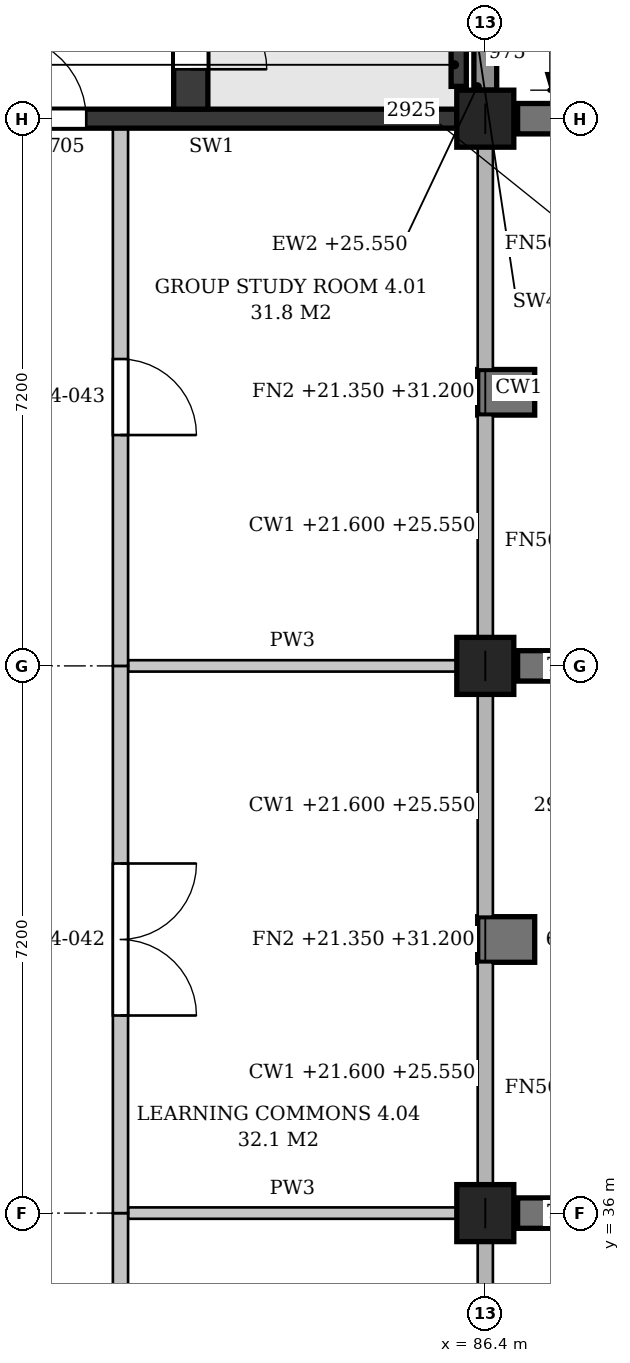
"""IFC4 building model, lengths in metres.
Left out: names, types, materials, properties, quantities, classifications, styles, units other than length and angle.
Written with IfcOpenShell. Run it as: python <this file> out.ifc"""

import sys

from ifc_helpers import new_model, si_unit, direction, frame, frame_2d, origin, origin_2d, place, context, subcontext, project, spatial, polyline, rectangle, outline, extrude, element, fill, save


model = new_model("IFC4")
c1 = context("Model", 3, precision=1e-05, world=origin(), true_north=direction((0.0, 1.0)))
c2 = subcontext(c1, "Body", "Model", "MODEL_VIEW")
j1 = project(units=[si_unit("LENGTHUNIT", "METRE"), si_unit("PLANEANGLEUNIT", "RADIAN")], contexts=[c1])
p1 = place(None, origin())
s1 = spatial("IfcSite", under=j1, at=p1, CompositionType="ELEMENT")
p2 = place(p1, origin())
s2 = spatial("IfcBuilding", under=s1, at=p2, CompositionType="ELEMENT")
p3 = place(p2, frame((0.0, 0.0, 21.6)))
s3 = spatial("IfcBuildingStorey", under=s2, at=p3, CompositionType="ELEMENT", Elevation=21.6)
for number, where, z_axis, x_axis in (
    (1, (86.4, 36.0, 0.0), (0.0, 0.0, 1.0), (1.0, 0.0, 0.0)),
    (2, (86.4, 43.2, 0.0), (0.0, 0.0, 1.0), (1.0, 0.0, 0.0)),
    (3, (86.4, 50.4, 0.0), (0.0, 0.0, 1.0), (1.0, 0.0, 0.0)),
):
    element("IfcColumn", number, at=place(p3, frame(where, z_axis=z_axis, x_axis=x_axis)), inside=s3, PredefinedType="COLUMN", context=c2, shape_type="SweptSolid", body=[
        extrude(rectangle(XDim=0.75, YDim=0.75, at=origin_2d()), origin(), (0.0, 0.0, 1.0), 4.8),
    ])
p4 = place(p3, frame((86.4, 50.775, 0.0), z_axis=(0.0, 0.0, 1.0), x_axis=(0.0, 1.0, 0.0)))
e4 = element("IfcWall", 4, at=p4, inside=s3, PredefinedType="STANDARD", context=c2, shape_type="SweptSolid", body=[
    extrude(rectangle(XDim=6.45, YDim=0.3, at=frame_2d((3.225, 0.0))), origin(), (0.0, 0.0, 1.0), 3.95),
])
p5 = place(p4, frame((0.975, 0.0, 0.9)))
e5 = element("IfcOpeningElement", 5, at=p5, cuts=e4, PredefinedType="OPENING", context=c2, shape_type="SweptSolid", body=[
    extrude(outline(polyline([(0.0, 0.0), (0.9, 0.0), (0.9, 2.05), (0.45, 2.5), (0.0, 2.05), (0.0, 0.0)])), frame((0.0, 0.16, 0.0), z_axis=(0.0, -1.0, 0.0), x_axis=(1.0, 0.0, 0.0)), (0.0, 0.0, 1.0), 0.32),
])
p6 = place(p4, frame((4.575, 0.0, 0.9)))
e6 = element("IfcOpeningElement", 6, at=p6, cuts=e4, PredefinedType="OPENING", context=c2, shape_type="SweptSolid", body=[
    extrude(outline(polyline([(0.0, 0.0), (0.9, 0.0), (0.9, 2.05), (0.45, 2.5), (0.0, 2.05), (0.0, 0.0)])), frame((0.0, 0.16, 0.0), z_axis=(0.0, -1.0, 0.0), x_axis=(1.0, 0.0, 0.0)), (0.0, 0.0, 1.0), 0.32),
])
for number, where, z_axis, x_axis in (
    (7, (86.3, 39.6, -0.25), (0.0, 0.0, 1.0), (1.0, 0.0, 0.0)),
    (8, (86.3, 46.8, -0.25), (0.0, 0.0, 1.0), (1.0, 0.0, 0.0)),
):
    element("IfcWall", number, at=place(p3, frame(where, z_axis=z_axis, x_axis=x_axis)), inside=s3, PredefinedType="POLYGONAL", context=c2, shape_type="SweptSolid", body=[
        extrude(outline(polyline([(0.75, 0.0), (0.75, 9.4), (0.45, 9.85), (0.3, 9.85), (0.3, 8.95), (0.0, 8.95), (0.0, 5.05), (0.35, 5.05), (0.35, 4.2), (0.0, 4.2), (0.0, 0.25), (0.35, 0.25), (0.35, 0.0), (0.75, 0.0)])), frame((0.0, 0.3, 0.0), z_axis=(0.0, -1.0, 0.0), x_axis=(1.0, 0.0, 0.0)), (0.0, 0.0, 1.0), 0.6),
    ])
for number, where, z_axis, x_axis in (
    (9, (86.825, 36.0, -0.25), (0.0, 0.0, 1.0), (1.0, 0.0, 0.0)),
    (10, (86.825, 43.2, -0.25), (0.0, 0.0, 1.0), (1.0, 0.0, 0.0)),
    (11, (86.825, 50.4, -0.25), (0.0, 0.0, 1.0), (1.0, 0.0, 0.0)),
):
    element("IfcWall", number, at=place(p3, frame(where, z_axis=z_axis, x_axis=x_axis)), inside=s3, PredefinedType="POLYGONAL", context=c2, shape_type="SweptSolid", body=[
        extrude(outline(polyline([(0.85, 0.0), (0.85, 8.8), (0.15, 9.85), (0.0, 9.85), (0.0, 0.0), (0.85, 0.0)])), frame((0.0, 0.2, 0.0), z_axis=(0.0, -1.0, 0.0), x_axis=(1.0, 0.0, 0.0)), (0.0, 0.0, 1.0), 0.4),
    ])
p7 = place(p3, frame((79.575, 50.4, 0.0), z_axis=(0.0, 0.0, 1.0), x_axis=(1.0, 0.0, 0.0)))
e12 = element("IfcWall", 12, at=p7, inside=s3, PredefinedType="SHEAR", context=c2, shape_type="SweptSolid", body=[
    extrude(rectangle(XDim=6.45, YDim=0.25, at=frame_2d((3.225, 0.0))), origin(), (0.0, 0.0, 1.0), 3.8),
])
p8 = place(p7, frame((0.475, 0.0, 0.0)))
e13 = element("IfcOpeningElement", 13, at=p8, cuts=e12, PredefinedType="OPENING", context=c2, shape_type="SweptSolid", body=[
    extrude(rectangle(XDim=1.1, YDim=2.1, at=frame_2d((0.55, 1.05))), frame((0.0, 0.135, 0.0), z_axis=(0.0, -1.0, 0.0), x_axis=(1.0, 0.0, 0.0)), (0.0, 0.0, 1.0), 0.27),
])
p9 = place(p3, frame((86.05, 50.825, -0.25), z_axis=(0.0, 0.0, 1.0), x_axis=(0.0, 1.0, 0.0)))
e14 = element("IfcWall", 14, at=p9, inside=s3, PredefinedType="SHEAR", context=c2, shape_type="SweptSolid", body=[
    extrude(rectangle(XDim=0.925, YDim=0.2, at=frame_2d((0.462, 0.0))), origin(), (0.0, 0.0, 1.0), 4.8),
])
p10 = place(p3, frame((82.525, 50.525, 0.0), z_axis=(0.0, 0.0, 1.0), x_axis=(0.0, 1.0, 0.0)))
e15 = element("IfcWall", 15, at=p10, inside=s3, PredefinedType="SHEAR", context=c2, shape_type="SweptSolid", body=[
    extrude(rectangle(XDim=6.85, YDim=0.45, at=frame_2d((3.425, 0.0))), origin(), (0.0, 0.0, 1.0), 4.55),
])
p11 = place(p10, frame((0.525, 0.0, 0.0)))
e16 = element("IfcOpeningElement", 16, at=p11, cuts=e15, PredefinedType="OPENING", context=c2, shape_type="SweptSolid", body=[
    extrude(rectangle(XDim=1.0, YDim=2.1, at=frame_2d((0.5, 1.05))), frame((0.0, 0.235, 0.0), z_axis=(0.0, -1.0, 0.0), x_axis=(1.0, 0.0, 0.0)), (0.0, 0.0, 1.0), 0.47),
])
for number, where, z_axis, x_axis in (
    (17, (81.7, 36.0, 0.0), (0.0, 0.0, 1.0), (1.0, 0.0, 0.0)),
    (18, (81.7, 43.2, 0.0), (0.0, 0.0, 1.0), (1.0, 0.0, 0.0)),
):
    element("IfcWall", number, at=place(p3, frame(where, z_axis=z_axis, x_axis=x_axis)), inside=s3, PredefinedType="PARTITIONING", context=c2, shape_type="SweptSolid", body=[
        extrude(rectangle(XDim=4.325, YDim=0.15, at=frame_2d((2.163, 0.0))), origin(), (0.0, 0.0, 1.0), 3.8),
    ])
p12 = place(p3, frame((81.6, 28.8, 0.0), z_axis=(0.0, 0.0, 1.0), x_axis=(0.0, 1.0, 0.0)))
e19 = element("IfcWall", 19, at=p12, inside=s3, PredefinedType="PARTITIONING", context=c2, shape_type="SweptSolid", body=[
    extrude(outline(polyline([(0.0, 0.0), (7.2, 0.0), (7.2, 3.8), (6.95, 3.8), (6.95, 4.55), (0.25, 4.55), (0.25, 3.8), (0.0, 3.8), (0.0, 0.0)])), frame((0.0, 0.1, 0.0), z_axis=(0.0, -1.0, 0.0), x_axis=(1.0, 0.0, 0.0)), (0.0, 0.0, 1.0), 0.2),
])
p13 = place(p12, frame((3.1, 0.0, 0.0)))
e20 = element("IfcOpeningElement", 20, at=p13, cuts=e19, PredefinedType="OPENING", context=c2, shape_type="SweptSolid", body=[
    extrude(rectangle(XDim=1.0, YDim=2.1, at=frame_2d((0.5, 1.05))), frame((0.0, 0.11, 0.0), z_axis=(0.0, -1.0, 0.0), x_axis=(1.0, 0.0, 0.0)), (0.0, 0.0, 1.0), 0.22),
])
p14 = place(p3, frame((81.6, 36.0, 0.0), z_axis=(0.0, 0.0, 1.0), x_axis=(0.0, 1.0, 0.0)))
e21 = element("IfcWall", 21, at=p14, inside=s3, PredefinedType="PARTITIONING", context=c2, shape_type="SweptSolid", body=[
    extrude(outline(polyline([(0.0, 0.0), (7.2, 0.0), (7.2, 3.8), (6.95, 3.8), (6.95, 4.55), (0.25, 4.55), (0.25, 3.8), (0.0, 3.8), (0.0, 0.0)])), frame((0.0, 0.1, 0.0), z_axis=(0.0, -1.0, 0.0), x_axis=(1.0, 0.0, 0.0)), (0.0, 0.0, 1.0), 0.2),
])
p15 = place(p14, frame((2.6, 0.0, 0.0)))
e22 = element("IfcOpeningElement", 22, at=p15, cuts=e21, PredefinedType="OPENING", context=c2, shape_type="SweptSolid", body=[
    extrude(rectangle(XDim=2.0, YDim=2.1, at=frame_2d((1.0, 1.05))), frame((0.0, 0.11, 0.0), z_axis=(0.0, -1.0, 0.0), x_axis=(1.0, 0.0, 0.0)), (0.0, 0.0, 1.0), 0.22),
])
p16 = place(p3, frame((81.6, 43.2, 0.0), z_axis=(0.0, 0.0, 1.0), x_axis=(0.0, 1.0, 0.0)))
e23 = element("IfcWall", 23, at=p16, inside=s3, PredefinedType="PARTITIONING", context=c2, shape_type="SweptSolid", body=[
    extrude(outline(polyline([(0.0, 0.0), (7.075, 0.0), (7.075, 3.8), (6.95, 3.8), (6.95, 4.55), (0.25, 4.55), (0.25, 3.8), (0.0, 3.8), (0.0, 0.0)])), frame((0.0, 0.1, 0.0), z_axis=(0.0, -1.0, 0.0), x_axis=(1.0, 0.0, 0.0)), (0.0, 0.0, 1.0), 0.2),
])
p17 = place(p16, frame((3.038, 0.0, 0.0)))
e24 = element("IfcOpeningElement", 24, at=p17, cuts=e23, PredefinedType="OPENING", context=c2, shape_type="SweptSolid", body=[
    extrude(rectangle(XDim=1.0, YDim=2.1, at=frame_2d((0.5, 1.05))), frame((0.0, 0.11, 0.0), z_axis=(0.0, -1.0, 0.0), x_axis=(1.0, 0.0, 0.0)), (0.0, 0.0, 1.0), 0.22),
])
p18 = place(p11, frame((1.0, 0.0, 0.0), z_axis=(0.0, 0.0, 1.0), x_axis=(-1.0, 0.0, 0.0)))
e25 = element("IfcDoor", 25, at=p18, inside=s3, OperationType="SINGLE_SWING_RIGHT", PredefinedType="DOOR", context=c2, shape_type="SweptSolid", body=[
    extrude(rectangle(XDim=1.0, YDim=2.1, at=frame_2d((0.5, 1.05))), frame((0.0, 0.025, 0.0), z_axis=(0.0, -1.0, 0.0), x_axis=(1.0, 0.0, 0.0)), (0.0, 0.0, 1.0), 0.05),
])
fill(e16, e25)
p19 = place(p8, origin())
e26 = element("IfcDoor", 26, at=p19, inside=s3, OperationType="SINGLE_SWING_LEFT", PredefinedType="DOOR", context=c2, shape_type="SweptSolid", body=[
    extrude(rectangle(XDim=1.1, YDim=2.1, at=frame_2d((0.55, 1.05))), frame((0.0, 0.025, 0.0), z_axis=(0.0, -1.0, 0.0), x_axis=(1.0, 0.0, 0.0)), (0.0, 0.0, 1.0), 0.05),
])
fill(e13, e26)
p20 = place(p15, origin())
e27 = element("IfcDoor", 27, at=p20, inside=s3, OperationType="DOUBLE_DOOR_SINGLE_SWING", PredefinedType="DOOR", context=c2, shape_type="SweptSolid", body=[
    extrude(rectangle(XDim=2.0, YDim=2.1, at=frame_2d((1.0, 1.05))), frame((0.0, 0.025, 0.0), z_axis=(0.0, -1.0, 0.0), x_axis=(1.0, 0.0, 0.0)), (0.0, 0.0, 1.0), 0.05),
])
fill(e22, e27)
p21 = place(p17, frame((1.0, 0.0, 0.0), z_axis=(0.0, 0.0, 1.0), x_axis=(-1.0, 0.0, 0.0)))
e28 = element("IfcDoor", 28, at=p21, inside=s3, OperationType="SINGLE_SWING_RIGHT", PredefinedType="DOOR", context=c2, shape_type="SweptSolid", body=[
    extrude(rectangle(XDim=1.0, YDim=2.1, at=frame_2d((0.5, 1.05))), frame((0.0, 0.025, 0.0), z_axis=(0.0, -1.0, 0.0), x_axis=(1.0, 0.0, 0.0)), (0.0, 0.0, 1.0), 0.05),
])
fill(e24, e28)
save(model, sys.argv[1])
